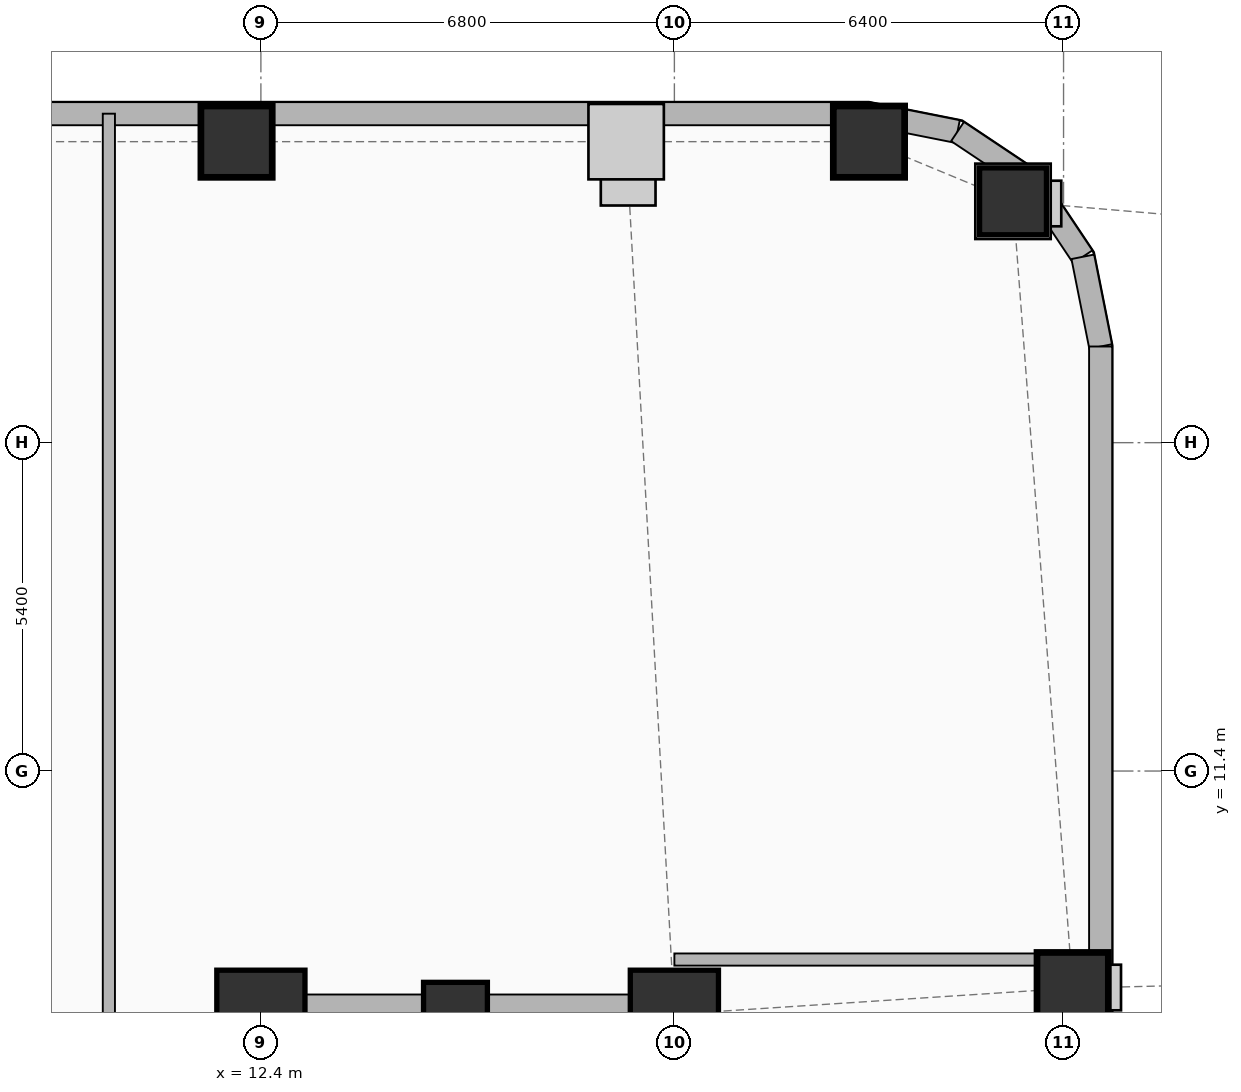
"""IFC4 building model, lengths in metres.
Left out: names, types, materials, properties, quantities, classifications, styles, units other than length and angle.
Written with IfcOpenShell. Run it as: python <this file> out.ifc"""

import sys

from ifc_helpers import new_model, si_unit, direction, frame, frame_2d, origin, origin_2d, place, context, subcontext, project, spatial, rectangle, hollow_rectangle, hollow_circle, extrude, element, fill, save


model = new_model("IFC4")
c1 = context("Model", 3, precision=1e-05, world=origin(), true_north=direction((0.0, 1.0)))
c2 = subcontext(c1, "Body", "Model", "MODEL_VIEW")
j1 = project(units=[si_unit("LENGTHUNIT", "METRE"), si_unit("PLANEANGLEUNIT", "RADIAN")], contexts=[c1])
p1 = place(None, origin())
s1 = spatial("IfcSite", under=j1, at=p1, CompositionType="ELEMENT")
p2 = place(p1, origin())
s2 = spatial("IfcBuilding", under=s1, at=p2, CompositionType="ELEMENT")
p3 = place(p2, frame((0.0, 0.0, 80.6)))
s3 = spatial("IfcBuildingStorey", under=s2, at=p3, CompositionType="ELEMENT", Elevation=80.6)
p4 = place(p3, frame((12.4, 7.4, 0.0), z_axis=(0.0, 0.0, 1.0), x_axis=(1.0, 0.0, 0.0)))
e1 = element("IfcColumn", 1, at=p4, inside=s3, PredefinedType="COLUMN", context=c2, shape_type="SweptSolid", body=[
    extrude(rectangle(XDim=1.45, YDim=1.45, at=origin_2d()), origin(), (0.0, 0.0, 1.0), 5.2),
])
p5 = place(p3, frame((15.6, 7.4, 0.0), z_axis=(0.0, 0.0, 1.0), x_axis=(1.0, 0.0, 0.0)))
e2 = element("IfcColumn", 2, at=p5, inside=s3, PredefinedType="COLUMN", context=c2, shape_type="SweptSolid", body=[
    extrude(rectangle(XDim=1.05, YDim=1.05, at=origin_2d()), origin(), (0.0, 0.0, 1.0), 5.2),
])
p6 = place(p3, frame((19.2, 7.4, 0.0), z_axis=(0.0, 0.0, 1.0), x_axis=(1.0, 0.0, 0.0)))
e3 = element("IfcColumn", 3, at=p6, inside=s3, PredefinedType="COLUMN", context=c2, shape_type="SweptSolid", body=[
    extrude(rectangle(XDim=1.45, YDim=1.45, at=origin_2d()), origin(), (0.0, 0.0, 1.0), 5.2),
])
p7 = place(p3, frame((12.075, 7.4, 0.0), z_axis=(0.0, 0.0, 1.0), x_axis=(1.0, 0.0, 0.0)))
e4 = element("IfcWall", 4, at=p7, inside=s3, PredefinedType="SHEAR", context=c2, shape_type="SweptSolid", body=[
    extrude(rectangle(XDim=7.45, YDim=0.65, at=frame_2d((3.725, 0.0))), origin(), (0.0, 0.0, 1.0), 4.8),
])
p8 = place(p3, frame((25.75, 7.83, 0.0), z_axis=(0.0, 0.0, 1.0), x_axis=(1.0, 0.0, 0.0)))
e5 = element("IfcColumn", 5, at=p8, inside=s3, PredefinedType="COLUMN", context=c2, shape_type="SweptSolid", body=[
    extrude(hollow_rectangle(XDim=1.15, YDim=1.15, WallThickness=0.04, at=origin_2d()), origin(), (0.0, 0.0, 1.0), 5.165),
])
p9 = place(p3, frame((24.769, 20.769, 0.0), z_axis=(0.0, 0.0, 1.0), x_axis=(1.0, 0.0, 0.0)))
e6 = element("IfcColumn", 6, at=p9, inside=s3, PredefinedType="COLUMN", context=c2, shape_type="SweptSolid", body=[
    extrude(hollow_circle(Radius=0.55, WallThickness=0.036, at=origin_2d()), origin(), (0.0, 0.0, 1.0), 5.165),
])
for number, where, z_axis, x_axis in (
    (7, (22.4, 21.75, 0.0), (0.0, 0.0, 1.0), (1.0, 0.0, 0.0)),
    (8, (12.0, 21.75, 0.0), (0.0, 0.0, 1.0), (1.0, 0.0, 0.0)),
):
    element("IfcColumn", number, at=place(p3, frame(where, z_axis=z_axis, x_axis=x_axis)), inside=s3, PredefinedType="COLUMN", context=c2, shape_type="SweptSolid", body=[
        extrude(hollow_rectangle(XDim=1.15, YDim=1.15, WallThickness=0.04, at=origin_2d()), origin(), (0.0, 0.0, 1.0), 5.165),
    ])
p10 = place(p3, frame((-29.581, 22.21, 0.0), z_axis=(0.0, 0.0, 1.0), x_axis=(1.0, 0.0, 0.0)))
e9 = element("IfcWall", 9, at=p10, inside=s3, PredefinedType="ELEMENTEDWALL", context=c2, shape_type="SweptSolid", body=[
    extrude(rectangle(XDim=51.963, YDim=0.38, at=frame_2d((25.981, 0.0))), origin(), (0.0, 0.0, 1.0), 3.69),
])
p11 = place(p10, frame((1.365, 0.0, 0.75)))
e10 = element("IfcOpeningElement", 10, at=p11, cuts=e9, PredefinedType="OPENING", context=c2, shape_type="SweptSolid", body=[
    extrude(rectangle(XDim=1.6, YDim=1.4, at=frame_2d((0.8, 0.7))), frame((0.0, 0.2, 0.0), z_axis=(0.0, -1.0, 0.0), x_axis=(1.0, 0.0, 0.0)), (0.0, 0.0, 1.0), 0.4),
])
p12 = place(p10, frame((5.695, 0.0, 0.75)))
e11 = element("IfcOpeningElement", 11, at=p12, cuts=e9, PredefinedType="OPENING", context=c2, shape_type="SweptSolid", body=[
    extrude(rectangle(XDim=1.6, YDim=1.4, at=frame_2d((0.8, 0.7))), frame((0.0, 0.2, 0.0), z_axis=(0.0, -1.0, 0.0), x_axis=(1.0, 0.0, 0.0)), (0.0, 0.0, 1.0), 0.4),
])
p13 = place(p10, frame((14.356, 0.0, 0.75)))
e12 = element("IfcOpeningElement", 12, at=p13, cuts=e9, PredefinedType="OPENING", context=c2, shape_type="SweptSolid", body=[
    extrude(rectangle(XDim=1.6, YDim=1.4, at=frame_2d((0.8, 0.7))), frame((0.0, 0.2, 0.0), z_axis=(0.0, -1.0, 0.0), x_axis=(1.0, 0.0, 0.0)), (0.0, 0.0, 1.0), 0.4),
])
p14 = place(p10, frame((23.016, 0.0, 0.75)))
e13 = element("IfcOpeningElement", 13, at=p14, cuts=e9, PredefinedType="OPENING", context=c2, shape_type="SweptSolid", body=[
    extrude(rectangle(XDim=1.6, YDim=1.4, at=frame_2d((0.8, 0.7))), frame((0.0, 0.2, 0.0), z_axis=(0.0, -1.0, 0.0), x_axis=(1.0, 0.0, 0.0)), (0.0, 0.0, 1.0), 0.4),
])
p15 = place(p10, frame((27.346, 0.0, 0.75)))
e14 = element("IfcOpeningElement", 14, at=p15, cuts=e9, PredefinedType="OPENING", context=c2, shape_type="SweptSolid", body=[
    extrude(rectangle(XDim=1.6, YDim=1.4, at=frame_2d((0.8, 0.7))), frame((0.0, 0.2, 0.0), z_axis=(0.0, -1.0, 0.0), x_axis=(1.0, 0.0, 0.0)), (0.0, 0.0, 1.0), 0.4),
])
p16 = place(p10, frame((36.007, 0.0, 0.75)))
e15 = element("IfcOpeningElement", 15, at=p16, cuts=e9, PredefinedType="OPENING", context=c2, shape_type="SweptSolid", body=[
    extrude(rectangle(XDim=1.6, YDim=1.4, at=frame_2d((0.8, 0.7))), frame((0.0, 0.2, 0.0), z_axis=(0.0, -1.0, 0.0), x_axis=(1.0, 0.0, 0.0)), (0.0, 0.0, 1.0), 0.4),
])
p17 = place(p10, frame((44.667, 0.0, 0.75)))
e16 = element("IfcOpeningElement", 16, at=p17, cuts=e9, PredefinedType="OPENING", context=c2, shape_type="SweptSolid", body=[
    extrude(rectangle(XDim=1.6, YDim=1.4, at=frame_2d((0.8, 0.7))), frame((0.0, 0.2, 0.0), z_axis=(0.0, -1.0, 0.0), x_axis=(1.0, 0.0, 0.0)), (0.0, 0.0, 1.0), 0.4),
])
p18 = place(p10, frame((48.998, 0.0, 0.75)))
e17 = element("IfcOpeningElement", 17, at=p18, cuts=e9, PredefinedType="OPENING", context=c2, shape_type="SweptSolid", body=[
    extrude(rectangle(XDim=1.6, YDim=1.4, at=frame_2d((0.8, 0.7))), frame((0.0, 0.2, 0.0), z_axis=(0.0, -1.0, 0.0), x_axis=(1.0, 0.0, 0.0)), (0.0, 0.0, 1.0), 0.4),
])
p19 = place(p3, frame((22.381, 22.21, 0.0), z_axis=(0.0, 0.0, 1.0), x_axis=(0.980786132421, -0.195086038585, 0.0)))
e18 = element("IfcWall", 18, at=p19, inside=s3, PredefinedType="ELEMENTEDWALL", context=c2, shape_type="SweptSolid", body=[
    extrude(rectangle(XDim=1.504, YDim=0.38, at=frame_2d((0.752, 0.0))), origin(), (0.0, 0.0, 1.0), 3.69),
])
p20 = place(p3, frame((23.857, 21.917, 0.0), z_axis=(0.0, 0.0, 1.0), x_axis=(0.831392092774, -0.555686231674, 0.0)))
e19 = element("IfcWall", 19, at=p20, inside=s3, PredefinedType="ELEMENTEDWALL", context=c2, shape_type="SweptSolid", body=[
    extrude(rectangle(XDim=1.485, YDim=0.38, at=frame_2d((0.743, 0.0))), origin(), (0.0, 0.0, 1.0), 3.69),
])
p21 = place(p3, frame((25.091, 21.091, 0.0), z_axis=(0.0, 0.0, 1.0), x_axis=(0.555686231674, -0.831392092774, 0.0)))
e20 = element("IfcWall", 20, at=p21, inside=s3, PredefinedType="ELEMENTEDWALL", context=c2, shape_type="SweptSolid", body=[
    extrude(rectangle(XDim=1.485, YDim=0.38, at=frame_2d((0.743, 0.0))), origin(), (0.0, 0.0, 1.0), 4.8),
])
p22 = place(p3, frame((25.917, 19.857, 0.0), z_axis=(0.0, 0.0, 1.0), x_axis=(0.195086038585, -0.980786132421, 0.0)))
e21 = element("IfcWall", 21, at=p22, inside=s3, PredefinedType="ELEMENTEDWALL", context=c2, shape_type="SweptSolid", body=[
    extrude(rectangle(XDim=1.504, YDim=0.38, at=frame_2d((0.752, 0.0))), origin(), (0.0, 0.0, 1.0), 4.8),
])
p23 = place(p3, frame((26.21, 18.381, 0.0), z_axis=(0.0, 0.0, 1.0), x_axis=(0.0, -1.0, 0.0)))
e22 = element("IfcWall", 22, at=p23, inside=s3, PredefinedType="ELEMENTEDWALL", context=c2, shape_type="SweptSolid", body=[
    extrude(rectangle(XDim=36.763, YDim=0.38, at=frame_2d((18.381, 0.0))), origin(), (0.0, 0.0, 1.0), 3.69),
])
p24 = place(p23, frame((1.498, 0.0, 0.75)))
e23 = element("IfcOpeningElement", 23, at=p24, cuts=e22, PredefinedType="OPENING", context=c2, shape_type="SweptSolid", body=[
    extrude(rectangle(XDim=1.6, YDim=1.4, at=frame_2d((0.8, 0.7))), frame((0.0, 0.2, 0.0), z_axis=(0.0, -1.0, 0.0), x_axis=(1.0, 0.0, 0.0)), (0.0, 0.0, 1.0), 0.4),
])
p25 = place(p23, frame((6.093, 0.0, 0.75)))
e24 = element("IfcOpeningElement", 24, at=p25, cuts=e22, PredefinedType="OPENING", context=c2, shape_type="SweptSolid", body=[
    extrude(rectangle(XDim=1.6, YDim=1.4, at=frame_2d((0.8, 0.7))), frame((0.0, 0.2, 0.0), z_axis=(0.0, -1.0, 0.0), x_axis=(1.0, 0.0, 0.0)), (0.0, 0.0, 1.0), 0.4),
])
p26 = place(p23, frame((15.284, 0.0, 0.75)))
e25 = element("IfcOpeningElement", 25, at=p26, cuts=e22, PredefinedType="OPENING", context=c2, shape_type="SweptSolid", body=[
    extrude(rectangle(XDim=1.6, YDim=1.4, at=frame_2d((0.8, 0.7))), frame((0.0, 0.2, 0.0), z_axis=(0.0, -1.0, 0.0), x_axis=(1.0, 0.0, 0.0)), (0.0, 0.0, 1.0), 0.4),
])
p27 = place(p23, frame((19.879, 0.0, 0.75)))
e26 = element("IfcOpeningElement", 26, at=p27, cuts=e22, PredefinedType="OPENING", context=c2, shape_type="SweptSolid", body=[
    extrude(rectangle(XDim=1.6, YDim=1.4, at=frame_2d((0.8, 0.7))), frame((0.0, 0.2, 0.0), z_axis=(0.0, -1.0, 0.0), x_axis=(1.0, 0.0, 0.0)), (0.0, 0.0, 1.0), 0.4),
])
p28 = place(p23, frame((29.07, 0.0, 0.75)))
e27 = element("IfcOpeningElement", 27, at=p28, cuts=e22, PredefinedType="OPENING", context=c2, shape_type="SweptSolid", body=[
    extrude(rectangle(XDim=1.6, YDim=1.4, at=frame_2d((0.8, 0.7))), frame((0.0, 0.2, 0.0), z_axis=(0.0, -1.0, 0.0), x_axis=(1.0, 0.0, 0.0)), (0.0, 0.0, 1.0), 0.4),
])
p29 = place(p23, frame((33.665, 0.0, 0.75)))
e28 = element("IfcOpeningElement", 28, at=p29, cuts=e22, PredefinedType="OPENING", context=c2, shape_type="SweptSolid", body=[
    extrude(rectangle(XDim=1.6, YDim=1.4, at=frame_2d((0.8, 0.7))), frame((0.0, 0.2, 0.0), z_axis=(0.0, -1.0, 0.0), x_axis=(1.0, 0.0, 0.0)), (0.0, 0.0, 1.0), 0.4),
])
p30 = place(p3, frame((19.2, 8.3, 0.0), z_axis=(0.0, 0.0, 1.0), x_axis=(1.0, 0.0, 0.0)))
e29 = element("IfcWall", 29, at=p30, inside=s3, PredefinedType="PARTITIONING", context=c2, shape_type="SweptSolid", body=[
    extrude(rectangle(XDim=7.01, YDim=0.2, at=frame_2d((3.505, 0.0))), origin(), (0.0, 0.0, 1.0), 3.69),
])
p31 = place(p3, frame((9.9, 7.1, 0.0), z_axis=(0.0, 0.0, 1.0), x_axis=(0.0, 1.0, 0.0)))
e30 = element("IfcWall", 30, at=p31, inside=s3, PredefinedType="PARTITIONING", context=c2, shape_type="SweptSolid", body=[
    extrude(rectangle(XDim=15.11, YDim=0.2, at=frame_2d((7.555, 0.0))), origin(), (0.0, 0.0, 1.0), 4.8),
])
p32 = place(p31, frame((8.239, 0.0, 0.0)))
e31 = element("IfcOpeningElement", 31, at=p32, cuts=e30, PredefinedType="OPENING", context=c2, shape_type="SweptSolid", body=[
    extrude(rectangle(XDim=1.05, YDim=2.05, at=frame_2d((0.525, 1.025))), frame((0.0, 0.11, 0.0), z_axis=(0.0, -1.0, 0.0), x_axis=(1.0, 0.0, 0.0)), (0.0, 0.0, 1.0), 0.22),
])
p33 = place(p17, origin())
e32 = element("IfcWindow", 32, at=p33, inside=s3, PartitioningType="SINGLE_PANEL", PredefinedType="WINDOW", context=c2, shape_type="SweptSolid", body=[
    extrude(rectangle(XDim=1.6, YDim=1.4, at=frame_2d((0.8, 0.7))), frame((0.0, 0.03, 0.0), z_axis=(0.0, -1.0, 0.0), x_axis=(1.0, 0.0, 0.0)), (0.0, 0.0, 1.0), 0.06),
])
fill(e16, e32)
p34 = place(p18, origin())
e33 = element("IfcWindow", 33, at=p34, inside=s3, PartitioningType="SINGLE_PANEL", PredefinedType="WINDOW", context=c2, shape_type="SweptSolid", body=[
    extrude(rectangle(XDim=1.6, YDim=1.4, at=frame_2d((0.8, 0.7))), frame((0.0, 0.03, 0.0), z_axis=(0.0, -1.0, 0.0), x_axis=(1.0, 0.0, 0.0)), (0.0, 0.0, 1.0), 0.06),
])
fill(e17, e33)
p35 = place(p24, origin())
e34 = element("IfcWindow", 34, at=p35, inside=s3, PartitioningType="SINGLE_PANEL", PredefinedType="WINDOW", context=c2, shape_type="SweptSolid", body=[
    extrude(rectangle(XDim=1.6, YDim=1.4, at=frame_2d((0.8, 0.7))), frame((0.0, 0.03, 0.0), z_axis=(0.0, -1.0, 0.0), x_axis=(1.0, 0.0, 0.0)), (0.0, 0.0, 1.0), 0.06),
])
fill(e23, e34)
p36 = place(p25, origin())
e35 = element("IfcWindow", 35, at=p36, inside=s3, PartitioningType="SINGLE_PANEL", PredefinedType="WINDOW", context=c2, shape_type="SweptSolid", body=[
    extrude(rectangle(XDim=1.6, YDim=1.4, at=frame_2d((0.8, 0.7))), frame((0.0, 0.03, 0.0), z_axis=(0.0, -1.0, 0.0), x_axis=(1.0, 0.0, 0.0)), (0.0, 0.0, 1.0), 0.06),
])
fill(e24, e35)
p37 = place(p32, origin())
e36 = element("IfcDoor", 36, at=p37, inside=s3, OperationType="SINGLE_SWING_RIGHT", PredefinedType="DOOR", context=c2, shape_type="SweptSolid", body=[
    extrude(rectangle(XDim=1.05, YDim=2.05, at=frame_2d((0.525, 1.025))), frame((0.0, 0.025, 0.0), z_axis=(0.0, -1.0, 0.0), x_axis=(1.0, 0.0, 0.0)), (0.0, 0.0, 1.0), 0.05),
])
fill(e31, e36)
save(model, sys.argv[1])
